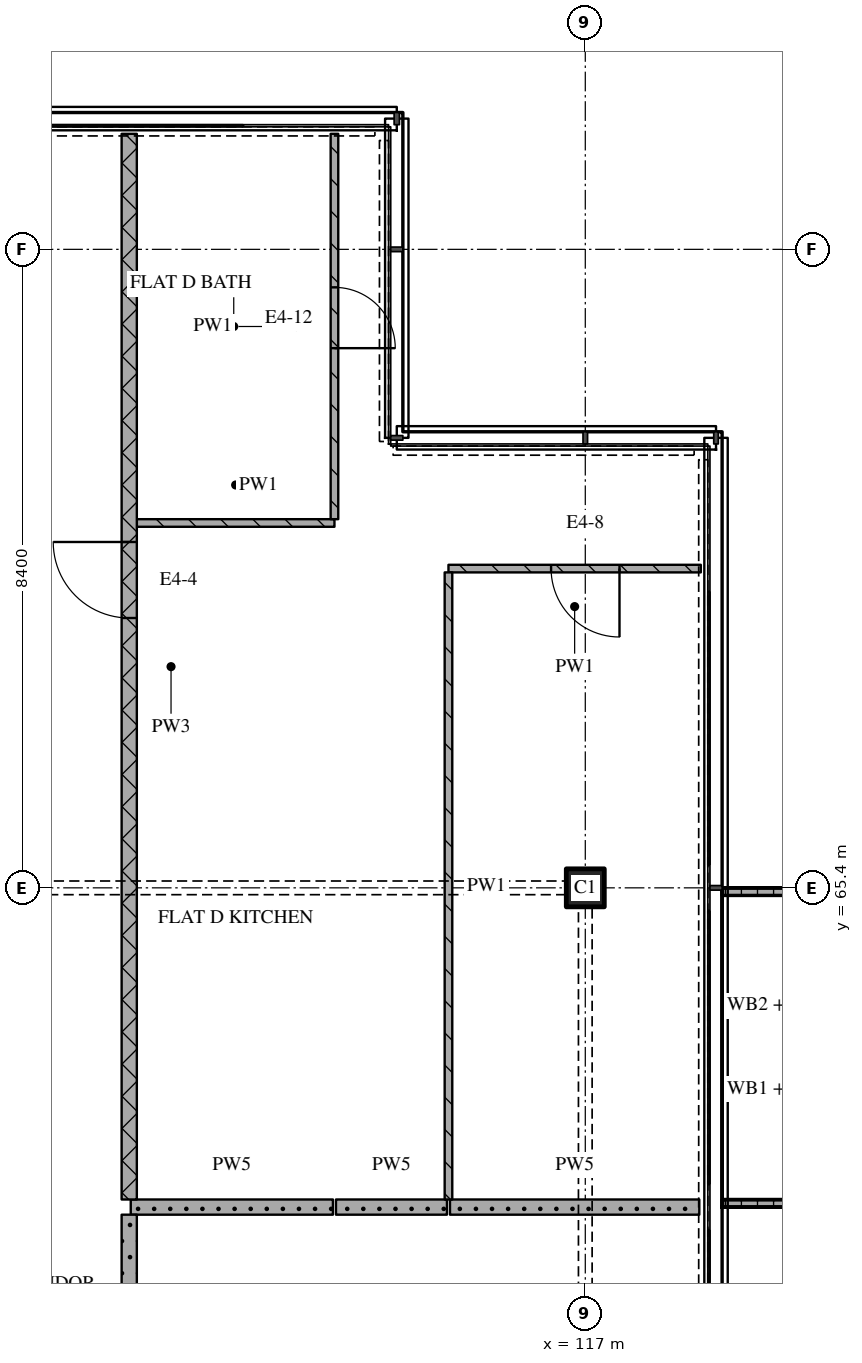
"""IFC4 building model, lengths in metres.
Left out: names, types, materials, properties, quantities, classifications, styles, units other than length and angle.
Written with IfcOpenShell. Run it as: python <this file> out.ifc"""

import sys

from ifc_helpers import new_model, si_unit, direction, frame, frame_2d, origin, origin_2d, place, context, subcontext, project, spatial, polyline, rectangle, outline, extrude, element, fill, save


model = new_model("IFC4")
c1 = context("Model", 3, precision=1e-05, world=origin(), true_north=direction((0.0, 1.0)))
c2 = subcontext(c1, "Body", "Model", "MODEL_VIEW")
j1 = project(units=[si_unit("LENGTHUNIT", "METRE"), si_unit("PLANEANGLEUNIT", "RADIAN")], contexts=[c1])
p1 = place(None, origin())
s1 = spatial("IfcSite", under=j1, at=p1, CompositionType="ELEMENT")
p2 = place(p1, origin())
s2 = spatial("IfcBuilding", under=s1, at=p2, CompositionType="ELEMENT")
p3 = place(p2, frame((0.0, 0.0, 285.15)))
s3 = spatial("IfcBuildingStorey", under=s2, at=p3, CompositionType="ELEMENT", Elevation=285.15)
p4 = place(p3, frame((117.0, 65.4, 0.0), z_axis=(0.0, 0.0, 1.0), x_axis=(1.0, 0.0, 0.0)))
e1 = element("IfcColumn", 1, at=p4, inside=s3, PredefinedType="COLUMN", context=c2, shape_type="SweptSolid", body=[
    extrude(rectangle(XDim=0.5, YDim=0.5, at=origin_2d()), origin(), (0.0, 0.0, 1.0), 3.6),
])
p5 = place(p3, origin())
e2 = element("IfcWall", 2, at=p5, inside=s3, PredefinedType="SOLIDWALL", context=c2, shape_type="SweptSolid", body=[
    extrude(outline(polyline([(118.8, 61.2), (118.8, 61.3), (120.433, 61.3), (120.433, 65.3), (118.8, 65.3), (118.8, 65.4), (120.533, 65.4), (120.533, 61.2), (118.8, 61.2)])), origin(), (0.0, 0.0, 1.0), 1.0),
])
p6 = place(p3, frame((111.02, 61.2, 0.0), z_axis=(0.0, 0.0, 1.0), x_axis=(1.0, 0.0, 0.0)))
e3 = element("IfcWall", 3, at=p6, inside=s3, PredefinedType="PARTITIONING", context=c2, shape_type="SweptSolid", body=[
    extrude(rectangle(XDim=2.66, YDim=0.2, at=frame_2d((1.33, 0.0))), origin(), (0.0, 0.0, 1.0), 3.32),
])
p7 = place(p3, frame((113.72, 61.2, 0.0), z_axis=(0.0, 0.0, 1.0), x_axis=(1.0, 0.0, 0.0)))
e4 = element("IfcWall", 4, at=p7, inside=s3, PredefinedType="PARTITIONING", context=c2, shape_type="SweptSolid", body=[
    extrude(rectangle(XDim=1.46, YDim=0.2, at=frame_2d((0.73, 0.0))), origin(), (0.0, 0.0, 1.0), 3.32),
])
p8 = place(p3, frame((115.22, 61.2, 0.0), z_axis=(0.0, 0.0, 1.0), x_axis=(1.0, 0.0, 0.0)))
e5 = element("IfcWall", 5, at=p8, inside=s3, PredefinedType="PARTITIONING", context=c2, shape_type="SweptSolid", body=[
    extrude(rectangle(XDim=3.28, YDim=0.2, at=frame_2d((1.64, 0.0))), origin(), (0.0, 0.0, 1.0), 3.32),
])
p9 = place(p3, frame((118.52, 69.6, 0.0), z_axis=(0.0, 0.0, 1.0), x_axis=(-1.0, 0.0, 0.0)))
e6 = element("IfcWall", 6, at=p9, inside=s3, PredefinedType="PARTITIONING", context=c2, shape_type="SweptSolid", body=[
    extrude(rectangle(XDim=3.32, YDim=0.1, at=frame_2d((1.66, 0.0))), origin(), (0.0, 0.0, 1.0), 3.32),
])
p10 = place(p9, frame((1.07, 0.0, 0.0)))
e7 = element("IfcOpeningElement", 7, at=p10, cuts=e6, PredefinedType="OPENING", context=c2, shape_type="SweptSolid", body=[
    extrude(rectangle(XDim=0.9, YDim=2.1, at=frame_2d((0.45, 1.05))), frame((0.0, 0.06, 0.0), z_axis=(0.0, -1.0, 0.0), x_axis=(1.0, 0.0, 0.0)), (0.0, 0.0, 1.0), 0.12),
])
p11 = place(p3, frame((111.1, 70.2, 0.0), z_axis=(0.0, 0.0, 1.0), x_axis=(1.0, 0.0, 0.0)))
e8 = element("IfcWall", 8, at=p11, inside=s3, PredefinedType="PARTITIONING", context=c2, shape_type="SweptSolid", body=[
    extrude(rectangle(XDim=2.6, YDim=0.1, at=frame_2d((1.3, 0.0))), origin(), (0.0, 0.0, 1.0), 3.32),
])
p12 = place(p3, frame((111.0, 75.32, 0.0), z_axis=(0.0, 0.0, 1.0), x_axis=(0.0, -1.0, 0.0)))
e9 = element("IfcWall", 9, at=p12, inside=s3, PredefinedType="PARTITIONING", context=c2, shape_type="SweptSolid", body=[
    extrude(rectangle(XDim=14.02, YDim=0.2, at=frame_2d((7.01, 0.0))), origin(), (0.0, 0.0, 1.0), 3.32),
])
p13 = place(p12, frame((5.37, 0.0, 0.0)))
e10 = element("IfcOpeningElement", 10, at=p13, cuts=e9, PredefinedType="OPENING", context=c2, shape_type="SweptSolid", body=[
    extrude(rectangle(XDim=1.0, YDim=2.1, at=frame_2d((0.5, 1.05))), frame((0.0, 0.11, 0.0), z_axis=(0.0, -1.0, 0.0), x_axis=(1.0, 0.0, 0.0)), (0.0, 0.0, 1.0), 0.22),
])
p14 = place(p3, frame((111.0, 61.1, 0.0), z_axis=(0.0, 0.0, 1.0), x_axis=(0.0, -1.0, 0.0)))
e11 = element("IfcWall", 11, at=p14, inside=s3, PredefinedType="PARTITIONING", context=c2, shape_type="SweptSolid", body=[
    extrude(rectangle(XDim=2.2, YDim=0.2, at=frame_2d((1.1, 0.0))), origin(), (0.0, 0.0, 1.0), 3.32),
])
p15 = place(p3, frame((113.7, 70.25, 0.0), z_axis=(0.0, 0.0, 1.0), x_axis=(0.0, 1.0, 0.0)))
e12 = element("IfcWall", 12, at=p15, inside=s3, PredefinedType="PARTITIONING", context=c2, shape_type="SweptSolid", body=[
    extrude(rectangle(XDim=5.07, YDim=0.1, at=frame_2d((2.535, 0.0))), origin(), (0.0, 0.0, 1.0), 3.32),
])
p16 = place(p15, frame((2.25, 0.0, 0.0)))
e13 = element("IfcOpeningElement", 13, at=p16, cuts=e12, PredefinedType="OPENING", context=c2, shape_type="SweptSolid", body=[
    extrude(rectangle(XDim=0.8, YDim=2.1, at=frame_2d((0.4, 1.05))), frame((0.0, 0.06, 0.0), z_axis=(0.0, -1.0, 0.0), x_axis=(1.0, 0.0, 0.0)), (0.0, 0.0, 1.0), 0.12),
])
p17 = place(p3, frame((115.2, 69.55, 0.0), z_axis=(0.0, 0.0, 1.0), x_axis=(0.0, -1.0, 0.0)))
e14 = element("IfcWall", 14, at=p17, inside=s3, PredefinedType="PARTITIONING", context=c2, shape_type="SweptSolid", body=[
    extrude(rectangle(XDim=8.25, YDim=0.1, at=frame_2d((4.125, 0.0))), origin(), (0.0, 0.0, 1.0), 3.32),
])
p18 = place(p10, origin())
e15 = element("IfcDoor", 15, at=p18, inside=s3, OperationType="SINGLE_SWING_LEFT", PredefinedType="DOOR", context=c2, shape_type="SweptSolid", body=[
    extrude(rectangle(XDim=0.9, YDim=2.1, at=frame_2d((0.45, 1.05))), frame((0.0, 0.025, 0.0), z_axis=(0.0, -1.0, 0.0), x_axis=(1.0, 0.0, 0.0)), (0.0, 0.0, 1.0), 0.05),
])
fill(e7, e15)
p19 = place(p13, origin())
e16 = element("IfcDoor", 16, at=p19, inside=s3, OperationType="SINGLE_SWING_RIGHT", PredefinedType="DOOR", context=c2, shape_type="SweptSolid", body=[
    extrude(rectangle(XDim=1.0, YDim=2.1, at=frame_2d((0.5, 1.05))), frame((0.0, 0.025, 0.0), z_axis=(0.0, -1.0, 0.0), x_axis=(1.0, 0.0, 0.0)), (0.0, 0.0, 1.0), 0.05),
])
fill(e10, e16)
p20 = place(p16, origin())
e17 = element("IfcDoor", 17, at=p20, inside=s3, OperationType="SINGLE_SWING_RIGHT", PredefinedType="DOOR", context=c2, shape_type="SweptSolid", body=[
    extrude(rectangle(XDim=0.8, YDim=2.1, at=frame_2d((0.4, 1.05))), frame((0.0, 0.025, 0.0), z_axis=(0.0, -1.0, 0.0), x_axis=(1.0, 0.0, 0.0)), (0.0, 0.0, 1.0), 0.05),
])
fill(e13, e17)
save(model, sys.argv[1])
